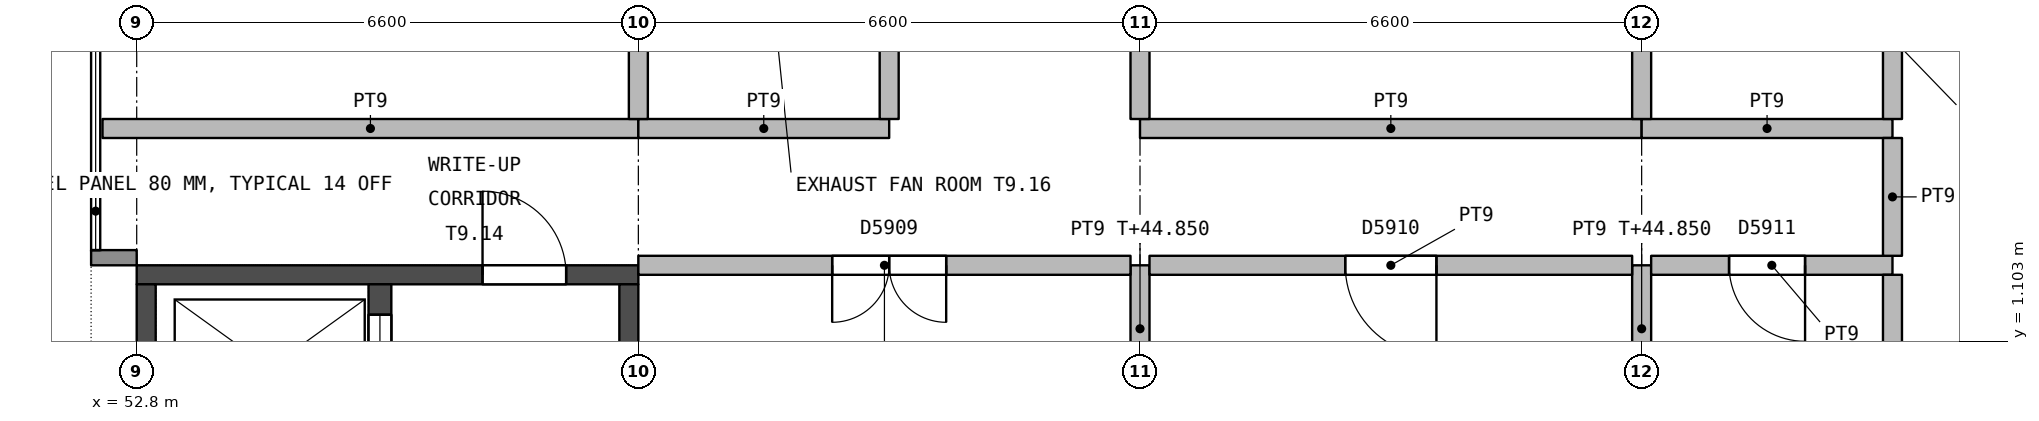
"""IFC4 building model, lengths in metres.
Left out: names, types, materials, properties, quantities, classifications, styles, units other than length and angle.
Written with IfcOpenShell. Run it as: python <this file> out.ifc"""

import sys

from ifc_helpers import new_model, si_unit, direction, frame, frame_2d, origin, place, context, subcontext, project, spatial, rectangle, extrude, element, fill, save


model = new_model("IFC4")
c1 = context("Model", 3, precision=1e-05, world=origin(), true_north=direction((0.0, 1.0)))
c2 = subcontext(c1, "Body", "Model", "MODEL_VIEW")
j1 = project(units=[si_unit("LENGTHUNIT", "METRE"), si_unit("PLANEANGLEUNIT", "RADIAN")], contexts=[c1])
p1 = place(None, origin())
s1 = spatial("IfcSite", under=j1, at=p1, CompositionType="ELEMENT")
p2 = place(p1, origin())
s2 = spatial("IfcBuilding", under=s1, at=p2, CompositionType="ELEMENT")
p3 = place(p2, frame((0.0, 0.0, 41.4)))
s3 = spatial("IfcBuildingStorey", under=s2, at=p3, CompositionType="ELEMENT", Elevation=41.4)
p4 = place(p3, frame((59.4, 1.975, 0.0), z_axis=(0.0, 0.0, 1.0), x_axis=(-1.0, 0.0, 0.0)))
e1 = element("IfcWall", 1, at=p4, inside=s3, PredefinedType="SHEAR", context=c2, shape_type="SweptSolid", body=[
    extrude(rectangle(XDim=6.6, YDim=0.25, at=frame_2d((3.3, 0.0))), origin(), (0.0, 0.0, 1.0), 4.25),
])
p5 = place(p4, frame((0.95, 0.0, 0.0)))
e2 = element("IfcOpeningElement", 2, at=p5, cuts=e1, PredefinedType="OPENING", context=c2, shape_type="SweptSolid", body=[
    extrude(rectangle(XDim=1.1, YDim=2.1, at=frame_2d((0.55, 1.05))), frame((0.0, 0.135, 0.0), z_axis=(0.0, -1.0, 0.0), x_axis=(1.0, 0.0, 0.0)), (0.0, 0.0, 1.0), 0.27),
])
for number, where, z_axis, x_axis in (
    (3, (59.275, 1.85, 0.0), (0.0, 0.0, 1.0), (0.0, -1.0, 0.0)),
    (4, (52.925, 1.85, 0.0), (0.0, 0.0, 1.0), (0.0, -1.0, 0.0)),
):
    element("IfcWall", number, at=place(p3, frame(where, z_axis=z_axis, x_axis=x_axis)), inside=s3, PredefinedType="SHEAR", context=c2, shape_type="SweptSolid", body=[
        extrude(rectangle(XDim=9.4, YDim=0.25, at=frame_2d((4.7, 0.0))), origin(), (0.0, 0.0, 1.0), 4.25),
    ])
p6 = place(p3, frame((56.0, 1.85, 0.0), z_axis=(0.0, 0.0, 1.0), x_axis=(0.0, -1.0, 0.0)))
e5 = element("IfcWall", 5, at=p6, inside=s3, PredefinedType="SHEAR", context=c2, shape_type="SweptSolid", body=[
    extrude(rectangle(XDim=6.35, YDim=0.3, at=frame_2d((3.175, 0.0))), origin(), (0.0, 0.0, 1.0), 4.25),
])
p7 = place(p6, frame((3.925, 0.0, 0.0)))
e6 = element("IfcOpeningElement", 6, at=p7, cuts=e5, PredefinedType="OPENING", context=c2, shape_type="SweptSolid", body=[
    extrude(rectangle(XDim=0.9, YDim=2.1, at=frame_2d((0.45, 1.05))), frame((0.0, 0.16, 0.0), z_axis=(0.0, -1.0, 0.0), x_axis=(1.0, 0.0, 0.0)), (0.0, 0.0, 1.0), 0.32),
])
p8 = place(p6, frame((0.4, 0.0, 0.0)))
e7 = element("IfcOpeningElement", 7, at=p8, cuts=e5, PredefinedType="OPENING", context=c2, shape_type="SweptSolid", body=[
    extrude(rectangle(XDim=1.4, YDim=2.4, at=frame_2d((0.7, 1.2))), frame((0.0, 0.16, 0.0), z_axis=(0.0, -1.0, 0.0), x_axis=(1.0, 0.0, 0.0)), (0.0, 0.0, 1.0), 0.32),
])
p9 = place(p3, frame((52.8, 2.2, 0.0), z_axis=(0.0, 0.0, 1.0), x_axis=(-1.0, 0.0, 0.0)))
e8 = element("IfcWall", 8, at=p9, inside=s3, PredefinedType="STANDARD", context=c2, shape_type="SweptSolid", body=[
    extrude(rectangle(XDim=0.6, YDim=0.2, at=frame_2d((0.3, 0.0))), origin(), (0.0, 0.0, 1.0), 3.65),
])
p10 = place(p3, frame((66.0, 0.35, 0.0), z_axis=(0.0, 0.0, 1.0), x_axis=(0.0, 1.0, 0.0)))
e9 = element("IfcWall", 9, at=p10, inside=s3, PredefinedType="PARTITIONING", context=c2, shape_type="SweptSolid", body=[
    extrude(rectangle(XDim=1.75, YDim=0.25, at=frame_2d((0.875, 0.0))), origin(), (0.0, 0.0, 1.0), 3.45),
])
p11 = place(p3, frame((65.875, 2.1, 0.0), z_axis=(0.0, 0.0, 1.0), x_axis=(-1.0, 0.0, 0.0)))
e10 = element("IfcWall", 10, at=p11, inside=s3, PredefinedType="PARTITIONING", context=c2, shape_type="SweptSolid", body=[
    extrude(rectangle(XDim=6.475, YDim=0.25, at=frame_2d((3.237, 0.0))), origin(), (0.0, 0.0, 1.0), 4.25),
])
p12 = place(p11, frame((2.425, 0.0, 0.0)))
e11 = element("IfcOpeningElement", 11, at=p12, cuts=e10, PredefinedType="OPENING", context=c2, shape_type="SweptSolid", body=[
    extrude(rectangle(XDim=1.5, YDim=2.4, at=frame_2d((0.75, 1.2))), frame((0.0, 0.135, 0.0), z_axis=(0.0, -1.0, 0.0), x_axis=(1.0, 0.0, 0.0)), (0.0, 0.0, 1.0), 0.27),
])
p13 = place(p3, frame((72.6, 0.35, 0.0), z_axis=(0.0, 0.0, 1.0), x_axis=(0.0, 1.0, 0.0)))
e12 = element("IfcWall", 12, at=p13, inside=s3, PredefinedType="PARTITIONING", context=c2, shape_type="SweptSolid", body=[
    extrude(rectangle(XDim=1.75, YDim=0.25, at=frame_2d((0.875, 0.0))), origin(), (0.0, 0.0, 1.0), 3.45),
])
p14 = place(p3, frame((72.475, 2.1, 0.0), z_axis=(0.0, 0.0, 1.0), x_axis=(-1.0, 0.0, 0.0)))
e13 = element("IfcWall", 13, at=p14, inside=s3, PredefinedType="PARTITIONING", context=c2, shape_type="SweptSolid", body=[
    extrude(rectangle(XDim=6.35, YDim=0.25, at=frame_2d((3.175, 0.0))), origin(), (0.0, 0.0, 1.0), 4.25),
])
p15 = place(p14, frame((2.575, 0.0, 0.0)))
e14 = element("IfcOpeningElement", 14, at=p15, cuts=e13, PredefinedType="OPENING", context=c2, shape_type="SweptSolid", body=[
    extrude(rectangle(XDim=1.2, YDim=2.4, at=frame_2d((0.6, 1.2))), frame((0.0, 0.135, 0.0), z_axis=(0.0, -1.0, 0.0), x_axis=(1.0, 0.0, 0.0)), (0.0, 0.0, 1.0), 0.27),
])
p16 = place(p3, frame((75.9, 2.1, 0.0), z_axis=(0.0, 0.0, 1.0), x_axis=(-1.0, 0.0, 0.0)))
e15 = element("IfcWall", 15, at=p16, inside=s3, PredefinedType="PARTITIONING", context=c2, shape_type="SweptSolid", body=[
    extrude(rectangle(XDim=3.175, YDim=0.25, at=frame_2d((1.587, 0.0))), origin(), (0.0, 0.0, 1.0), 4.25),
])
p17 = place(p16, frame((1.15, 0.0, 0.0)))
e16 = element("IfcOpeningElement", 16, at=p17, cuts=e15, PredefinedType="OPENING", context=c2, shape_type="SweptSolid", body=[
    extrude(rectangle(XDim=1.0, YDim=2.4, at=frame_2d((0.5, 1.2))), frame((0.0, 0.135, 0.0), z_axis=(0.0, -1.0, 0.0), x_axis=(1.0, 0.0, 0.0)), (0.0, 0.0, 1.0), 0.27),
])
p18 = place(p3, frame((75.9, -8.25, 0.0), z_axis=(0.0, 0.0, 1.0), x_axis=(0.0, 1.0, 0.0)))
e17 = element("IfcWall", 17, at=p18, inside=s3, PredefinedType="PARTITIONING", context=c2, shape_type="SweptSolid", body=[
    extrude(rectangle(XDim=10.225, YDim=0.25, at=frame_2d((5.113, 0.0))), origin(), (0.0, 0.0, 1.0), 4.25),
])
p19 = place(p3, frame((59.4, 3.9, 0.0), z_axis=(0.0, 0.0, 1.0), x_axis=(-1.0, 0.0, 0.0)))
e18 = element("IfcWall", 18, at=p19, inside=s3, PredefinedType="PARTITIONING", context=c2, shape_type="SweptSolid", body=[
    extrude(rectangle(XDim=7.05, YDim=0.25, at=frame_2d((3.525, 0.0))), origin(), (0.0, 0.0, 1.0), 4.25),
])
p20 = place(p3, frame((62.7, 3.9, 0.0), z_axis=(0.0, 0.0, 1.0), x_axis=(-1.0, 0.0, 0.0)))
e19 = element("IfcWall", 19, at=p20, inside=s3, PredefinedType="PARTITIONING", context=c2, shape_type="SweptSolid", body=[
    extrude(rectangle(XDim=3.3, YDim=0.25, at=frame_2d((1.65, 0.0))), origin(), (0.0, 0.0, 1.0), 4.25),
])
p21 = place(p3, frame((72.6, 3.9, 0.0), z_axis=(0.0, 0.0, 1.0), x_axis=(-1.0, 0.0, 0.0)))
e20 = element("IfcWall", 20, at=p21, inside=s3, PredefinedType="PARTITIONING", context=c2, shape_type="SweptSolid", body=[
    extrude(rectangle(XDim=6.6, YDim=0.25, at=frame_2d((3.3, 0.0))), origin(), (0.0, 0.0, 1.0), 4.25),
])
p22 = place(p3, frame((75.9, 3.9, 0.0), z_axis=(0.0, 0.0, 1.0), x_axis=(-1.0, 0.0, 0.0)))
e21 = element("IfcWall", 21, at=p22, inside=s3, PredefinedType="PARTITIONING", context=c2, shape_type="SweptSolid", body=[
    extrude(rectangle(XDim=3.3, YDim=0.25, at=frame_2d((1.65, 0.0))), origin(), (0.0, 0.0, 1.0), 4.25),
])
p23 = place(p3, frame((75.9, 2.225, 0.0), z_axis=(0.0, 0.0, 1.0), x_axis=(0.0, 1.0, 0.0)))
e22 = element("IfcWall", 22, at=p23, inside=s3, PredefinedType="PARTITIONING", context=c2, shape_type="SweptSolid", body=[
    extrude(rectangle(XDim=1.55, YDim=0.25, at=frame_2d((0.775, 0.0))), origin(), (0.0, 0.0, 1.0), 4.25),
])
p24 = place(p3, frame((59.4, 4.025, 0.0), z_axis=(0.0, 0.0, 1.0), x_axis=(0.0, 1.0, 0.0)))
e23 = element("IfcWall", 23, at=p24, inside=s3, PredefinedType="PARTITIONING", context=c2, shape_type="SweptSolid", body=[
    extrude(rectangle(XDim=5.525, YDim=0.25, at=frame_2d((2.763, 0.0))), origin(), (0.0, 0.0, 1.0), 3.45),
])
p25 = place(p3, frame((62.7, 9.775, 0.0), z_axis=(0.0, 0.0, 1.0), x_axis=(0.0, -1.0, 0.0)))
e24 = element("IfcWall", 24, at=p25, inside=s3, PredefinedType="PARTITIONING", context=c2, shape_type="SweptSolid", body=[
    extrude(rectangle(XDim=5.75, YDim=0.25, at=frame_2d((2.875, 0.0))), origin(), (0.0, 0.0, 1.0), 4.25),
])
p26 = place(p25, frame((2.125, 0.0, 0.0)))
e25 = element("IfcOpeningElement", 25, at=p26, cuts=e24, PredefinedType="OPENING", context=c2, shape_type="SweptSolid", body=[
    extrude(rectangle(XDim=1.5, YDim=2.4, at=frame_2d((0.75, 1.2))), frame((0.0, 0.135, 0.0), z_axis=(0.0, -1.0, 0.0), x_axis=(1.0, 0.0, 0.0)), (0.0, 0.0, 1.0), 0.27),
])
for number, where, z_axis, x_axis in (
    (26, (66.0, 4.025, 0.0), (0.0, 0.0, 1.0), (0.0, 1.0, 0.0)),
    (27, (72.6, 4.025, 0.0), (0.0, 0.0, 1.0), (0.0, 1.0, 0.0)),
):
    element("IfcWall", number, at=place(p3, frame(where, z_axis=z_axis, x_axis=x_axis)), inside=s3, PredefinedType="PARTITIONING", context=c2, shape_type="SweptSolid", body=[
        extrude(rectangle(XDim=5.525, YDim=0.25, at=frame_2d((2.763, 0.0))), origin(), (0.0, 0.0, 1.0), 3.45),
    ])
p27 = place(p3, frame((75.9, 4.025, 0.0), z_axis=(0.0, 0.0, 1.0), x_axis=(0.0, 1.0, 0.0)))
e28 = element("IfcWall", 28, at=p27, inside=s3, PredefinedType="PARTITIONING", context=c2, shape_type="SweptSolid", body=[
    extrude(rectangle(XDim=5.75, YDim=0.25, at=frame_2d((2.875, 0.0))), origin(), (0.0, 0.0, 1.0), 4.25),
])
p28 = place(p5, origin())
e29 = element("IfcDoor", 29, at=p28, inside=s3, OperationType="SINGLE_SWING_RIGHT", PredefinedType="DOOR", context=c2, shape_type="SweptSolid", body=[
    extrude(rectangle(XDim=1.1, YDim=2.1, at=frame_2d((0.55, 1.05))), frame((0.0, 0.025, 0.0), z_axis=(0.0, -1.0, 0.0), x_axis=(1.0, 0.0, 0.0)), (0.0, 0.0, 1.0), 0.05),
])
fill(e2, e29)
p29 = place(p8, origin())
e30 = element("IfcDoor", 30, at=p29, inside=s3, OperationType="DOUBLE_DOOR_SLIDING", PredefinedType="NOTDEFINED", context=c2, shape_type="SweptSolid", body=[
    extrude(rectangle(XDim=1.4, YDim=2.4, at=frame_2d((0.7, 1.2))), frame((0.0, 0.025, 0.0), z_axis=(0.0, -1.0, 0.0), x_axis=(1.0, 0.0, 0.0)), (0.0, 0.0, 1.0), 0.05),
])
fill(e7, e30)
p30 = place(p12, origin())
e31 = element("IfcDoor", 31, at=p30, inside=s3, OperationType="DOUBLE_DOOR_SINGLE_SWING", PredefinedType="DOOR", context=c2, shape_type="SweptSolid", body=[
    extrude(rectangle(XDim=1.5, YDim=2.4, at=frame_2d((0.75, 1.2))), frame((0.0, 0.03, 0.0), z_axis=(0.0, -1.0, 0.0), x_axis=(1.0, 0.0, 0.0)), (0.0, 0.0, 1.0), 0.06),
])
fill(e11, e31)
p31 = place(p15, origin())
e32 = element("IfcDoor", 32, at=p31, inside=s3, OperationType="SINGLE_SWING_LEFT", PredefinedType="DOOR", context=c2, shape_type="SweptSolid", body=[
    extrude(rectangle(XDim=1.2, YDim=2.4, at=frame_2d((0.6, 1.2))), frame((0.0, 0.03, 0.0), z_axis=(0.0, -1.0, 0.0), x_axis=(1.0, 0.0, 0.0)), (0.0, 0.0, 1.0), 0.06),
])
fill(e14, e32)
p32 = place(p17, origin())
e33 = element("IfcDoor", 33, at=p32, inside=s3, OperationType="SINGLE_SWING_LEFT", PredefinedType="DOOR", context=c2, shape_type="SweptSolid", body=[
    extrude(rectangle(XDim=1.0, YDim=2.4, at=frame_2d((0.5, 1.2))), frame((0.0, 0.03, 0.0), z_axis=(0.0, -1.0, 0.0), x_axis=(1.0, 0.0, 0.0)), (0.0, 0.0, 1.0), 0.06),
])
fill(e16, e33)
save(model, sys.argv[1])
